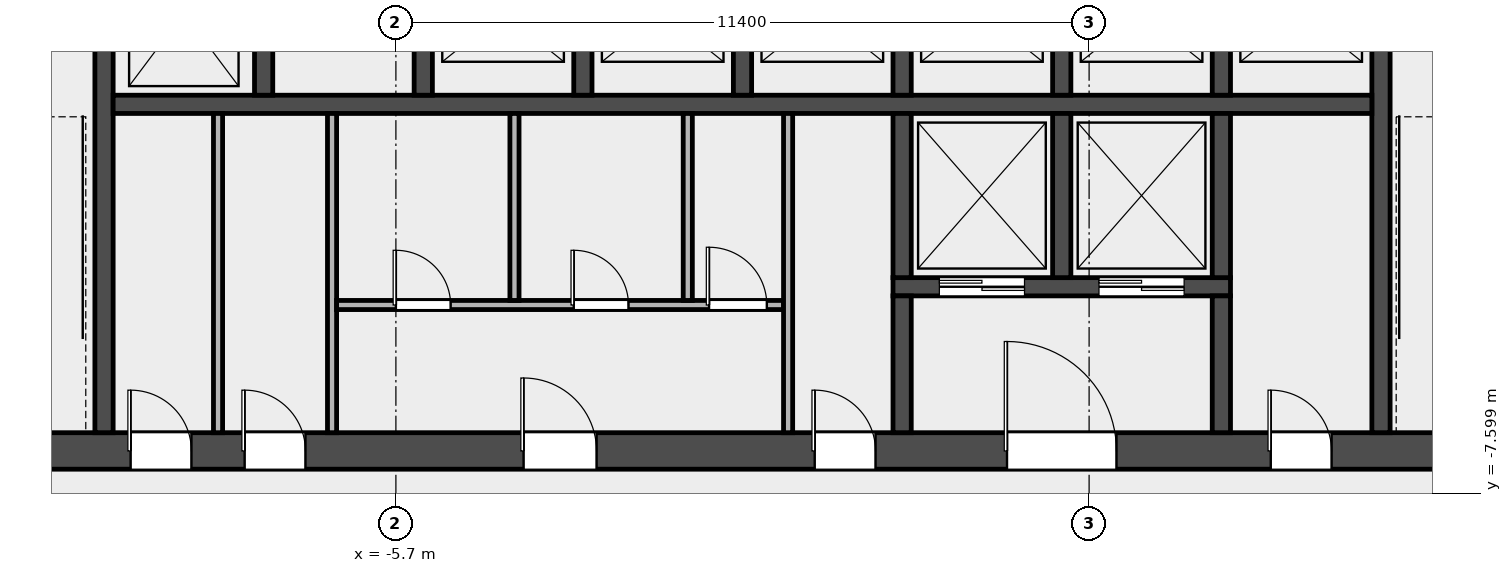
"""IFC4 building model, lengths in metres.
Left out: names, types, materials, properties, quantities, classifications, styles, units other than length and angle.
Written with IfcOpenShell. Run it as: python <this file> out.ifc"""

import sys

from ifc_helpers import new_model, si_unit, direction, frame, frame_2d, origin, place, context, subcontext, project, spatial, rectangle, extrude, element, fill, save


model = new_model("IFC4")
c1 = context("Model", 3, precision=1e-05, world=origin(), true_north=direction((0.0, 1.0)))
c2 = subcontext(c1, "Body", "Model", "MODEL_VIEW")
j1 = project(units=[si_unit("LENGTHUNIT", "METRE"), si_unit("PLANEANGLEUNIT", "RADIAN")], contexts=[c1])
p1 = place(None, origin())
s1 = spatial("IfcSite", under=j1, at=p1, CompositionType="ELEMENT")
p2 = place(p1, origin())
s2 = spatial("IfcBuilding", under=s1, at=p2, CompositionType="ELEMENT")
p3 = place(p2, frame((0.0, 0.0, 31.0)))
s3 = spatial("IfcBuildingStorey", under=s2, at=p3, CompositionType="ELEMENT", Elevation=31.0)
p4 = place(p3, frame((-14.4, -6.9, 0.0), z_axis=(0.0, 0.0, 1.0), x_axis=(1.0, 0.0, 0.0)))
e1 = element("IfcWall", 1, at=p4, inside=s3, PredefinedType="SHEAR", context=c2, shape_type="SweptSolid", body=[
    extrude(rectangle(XDim=28.8, YDim=0.6, at=frame_2d((14.4, 0.0))), origin(), (0.0, 0.0, 1.0), 4.5),
])
p5 = place(p4, frame((4.337, 0.0, 0.0)))
e2 = element("IfcOpeningElement", 2, at=p5, cuts=e1, PredefinedType="OPENING", context=c2, shape_type="SweptSolid", body=[
    extrude(rectangle(XDim=1.0, YDim=2.1, at=frame_2d((0.5, 1.05))), frame((0.0, 0.312, 0.0), z_axis=(0.0, -1.0, 0.0), x_axis=(1.0, 0.0, 0.0)), (0.0, 0.0, 1.0), 0.624),
])
p6 = place(p4, frame((6.212, 0.0, 0.0)))
e3 = element("IfcOpeningElement", 3, at=p6, cuts=e1, PredefinedType="OPENING", context=c2, shape_type="SweptSolid", body=[
    extrude(rectangle(XDim=1.0, YDim=2.1, at=frame_2d((0.5, 1.05))), frame((0.0, 0.312, 0.0), z_axis=(0.0, -1.0, 0.0), x_axis=(1.0, 0.0, 0.0)), (0.0, 0.0, 1.0), 0.624),
])
p7 = place(p4, frame((10.8, 0.0, 0.0)))
e4 = element("IfcOpeningElement", 4, at=p7, cuts=e1, PredefinedType="OPENING", context=c2, shape_type="SweptSolid", body=[
    extrude(rectangle(XDim=1.2, YDim=2.1, at=frame_2d((0.6, 1.05))), frame((0.0, 0.312, 0.0), z_axis=(0.0, -1.0, 0.0), x_axis=(1.0, 0.0, 0.0)), (0.0, 0.0, 1.0), 0.624),
])
p8 = place(p4, frame((15.587, 0.0, 0.0)))
e5 = element("IfcOpeningElement", 5, at=p8, cuts=e1, PredefinedType="OPENING", context=c2, shape_type="SweptSolid", body=[
    extrude(rectangle(XDim=1.0, YDim=2.1, at=frame_2d((0.5, 1.05))), frame((0.0, 0.312, 0.0), z_axis=(0.0, -1.0, 0.0), x_axis=(1.0, 0.0, 0.0)), (0.0, 0.0, 1.0), 0.624),
])
p9 = place(p4, frame((18.75, 0.0, 0.0)))
e6 = element("IfcOpeningElement", 6, at=p9, cuts=e1, PredefinedType="OPENING", context=c2, shape_type="SweptSolid", body=[
    extrude(rectangle(XDim=1.8, YDim=2.1, at=frame_2d((0.9, 1.05))), frame((0.0, 0.312, 0.0), z_axis=(0.0, -1.0, 0.0), x_axis=(1.0, 0.0, 0.0)), (0.0, 0.0, 1.0), 0.624),
])
p10 = place(p4, frame((23.087, 0.0, 0.0)))
e7 = element("IfcOpeningElement", 7, at=p10, cuts=e1, PredefinedType="OPENING", context=c2, shape_type="SweptSolid", body=[
    extrude(rectangle(XDim=1.0, YDim=2.1, at=frame_2d((0.5, 1.05))), frame((0.0, 0.312, 0.0), z_axis=(0.0, -1.0, 0.0), x_axis=(1.0, 0.0, 0.0)), (0.0, 0.0, 1.0), 0.624),
])
for number, where, z_axis, x_axis in (
    (8, (-10.5, -6.6, 0.0), (0.0, 0.0, 1.0), (0.0, 1.0, 0.0)),
    (9, (10.5, -6.6, 0.0), (0.0, 0.0, 1.0), (0.0, 1.0, 0.0)),
):
    element("IfcWall", number, at=place(p3, frame(where, z_axis=z_axis, x_axis=x_axis)), inside=s3, PredefinedType="SHEAR", context=c2, shape_type="SweptSolid", body=[
        extrude(rectangle(XDim=8.55, YDim=0.3, at=frame_2d((4.275, 0.0))), origin(), (0.0, 0.0, 1.0), 4.5),
    ])
p11 = place(p3, frame((-10.35, -1.2, 0.0), z_axis=(0.0, 0.0, 1.0), x_axis=(1.0, 0.0, 0.0)))
e10 = element("IfcWall", 10, at=p11, inside=s3, PredefinedType="SOLIDWALL", context=c2, shape_type="SweptSolid", body=[
    extrude(rectangle(XDim=20.7, YDim=0.3, at=frame_2d((10.35, 0.0))), origin(), (0.0, 0.0, 1.0), 4.5),
])
for number, where, z_axis, x_axis in (
    (11, (-7.875, -1.05, 0.0), (0.0, 0.0, 1.0), (0.0, 1.0, 0.0)),
    (12, (-5.25, -1.05, 0.0), (0.0, 0.0, 1.0), (0.0, 1.0, 0.0)),
    (13, (-2.625, -1.05, 0.0), (0.0, 0.0, 1.0), (0.0, 1.0, 0.0)),
    (14, (0.0, -1.05, 0.0), (0.0, 0.0, 1.0), (0.0, 1.0, 0.0)),
    (15, (2.625, -1.05, 0.0), (0.0, 0.0, 1.0), (0.0, 1.0, 0.0)),
    (16, (5.25, -1.05, 0.0), (0.0, 0.0, 1.0), (0.0, 1.0, 0.0)),
    (17, (7.875, -1.05, 0.0), (0.0, 0.0, 1.0), (0.0, 1.0, 0.0)),
):
    element("IfcWall", number, at=place(p3, frame(where, z_axis=z_axis, x_axis=x_axis)), inside=s3, PredefinedType="SOLIDWALL", context=c2, shape_type="SweptSolid", body=[
        extrude(rectangle(XDim=2.7, YDim=0.3, at=frame_2d((1.35, 0.0))), origin(), (0.0, 0.0, 1.0), 4.5),
    ])
p12 = place(p3, frame((2.475, -4.2, 0.0), z_axis=(0.0, 0.0, 1.0), x_axis=(1.0, 0.0, 0.0)))
e18 = element("IfcWall", 18, at=p12, inside=s3, PredefinedType="SOLIDWALL", context=c2, shape_type="SweptSolid", body=[
    extrude(rectangle(XDim=5.55, YDim=0.3, at=frame_2d((2.775, 0.0))), origin(), (0.0, 0.0, 1.0), 4.5),
])
p13 = place(p12, frame((0.762, 0.0, 0.0)))
e19 = element("IfcOpeningElement", 19, at=p13, cuts=e18, PredefinedType="OPENING", context=c2, shape_type="SweptSolid", body=[
    extrude(rectangle(XDim=1.4, YDim=2.1, at=frame_2d((0.7, 1.05))), frame((0.0, 0.162, 0.0), z_axis=(0.0, -1.0, 0.0), x_axis=(1.0, 0.0, 0.0)), (0.0, 0.0, 1.0), 0.324),
])
p14 = place(p12, frame((3.387, 0.0, 0.0)))
e20 = element("IfcOpeningElement", 20, at=p14, cuts=e18, PredefinedType="OPENING", context=c2, shape_type="SweptSolid", body=[
    extrude(rectangle(XDim=1.4, YDim=2.1, at=frame_2d((0.7, 1.05))), frame((0.0, 0.162, 0.0), z_axis=(0.0, -1.0, 0.0), x_axis=(1.0, 0.0, 0.0)), (0.0, 0.0, 1.0), 0.324),
])
p15 = place(p3, frame((2.625, -4.05, 0.0), z_axis=(0.0, 0.0, 1.0), x_axis=(0.0, 1.0, 0.0)))
e21 = element("IfcWall", 21, at=p15, inside=s3, PredefinedType="SOLIDWALL", context=c2, shape_type="SweptSolid", body=[
    extrude(rectangle(XDim=2.7, YDim=0.3, at=frame_2d((1.35, 0.0))), origin(), (0.0, 0.0, 1.0), 4.5),
])
p16 = place(p3, frame((2.625, -6.6, 0.0), z_axis=(0.0, 0.0, 1.0), x_axis=(0.0, 1.0, 0.0)))
e22 = element("IfcWall", 22, at=p16, inside=s3, PredefinedType="SOLIDWALL", context=c2, shape_type="SweptSolid", body=[
    extrude(rectangle(XDim=2.25, YDim=0.3, at=frame_2d((1.125, 0.0))), origin(), (0.0, 0.0, 1.0), 4.5),
])
for number, where, z_axis, x_axis in (
    (23, (5.25, -4.05, 0.0), (0.0, 0.0, 1.0), (0.0, 1.0, 0.0)),
    (24, (7.875, -4.05, 0.0), (0.0, 0.0, 1.0), (0.0, 1.0, 0.0)),
):
    element("IfcWall", number, at=place(p3, frame(where, z_axis=z_axis, x_axis=x_axis)), inside=s3, PredefinedType="SOLIDWALL", context=c2, shape_type="SweptSolid", body=[
        extrude(rectangle(XDim=2.7, YDim=0.3, at=frame_2d((1.35, 0.0))), origin(), (0.0, 0.0, 1.0), 4.5),
    ])
p17 = place(p3, frame((7.875, -6.6, 0.0), z_axis=(0.0, 0.0, 1.0), x_axis=(0.0, 1.0, 0.0)))
e25 = element("IfcWall", 25, at=p17, inside=s3, PredefinedType="SOLIDWALL", context=c2, shape_type="SweptSolid", body=[
    extrude(rectangle(XDim=2.25, YDim=0.3, at=frame_2d((1.125, 0.0))), origin(), (0.0, 0.0, 1.0), 4.5),
])
for number, where, z_axis, x_axis in (
    (26, (-8.625, -6.6, 0.0), (0.0, 0.0, 1.0), (0.0, 1.0, 0.0)),
    (27, (-6.75, -6.6, 0.0), (0.0, 0.0, 1.0), (0.0, 1.0, 0.0)),
):
    element("IfcWall", number, at=place(p3, frame(where, z_axis=z_axis, x_axis=x_axis)), inside=s3, PredefinedType="PARTITIONING", context=c2, shape_type="SweptSolid", body=[
        extrude(rectangle(XDim=5.25, YDim=0.15, at=frame_2d((2.625, 0.0))), origin(), (0.0, 0.0, 1.0), 4.5),
    ])
p18 = place(p3, frame((-6.675, -4.5, 0.0), z_axis=(0.0, 0.0, 1.0), x_axis=(1.0, 0.0, 0.0)))
e28 = element("IfcWall", 28, at=p18, inside=s3, PredefinedType="PARTITIONING", context=c2, shape_type="SweptSolid", body=[
    extrude(rectangle(XDim=7.35, YDim=0.15, at=frame_2d((3.675, 0.0))), origin(), (0.0, 0.0, 1.0), 4.5),
])
p19 = place(p18, frame((0.975, 0.0, 0.0)))
e29 = element("IfcOpeningElement", 29, at=p19, cuts=e28, PredefinedType="OPENING", context=c2, shape_type="SweptSolid", body=[
    extrude(rectangle(XDim=0.9, YDim=2.1, at=frame_2d((0.45, 1.05))), frame((0.0, 0.087, 0.0), z_axis=(0.0, -1.0, 0.0), x_axis=(1.0, 0.0, 0.0)), (0.0, 0.0, 1.0), 0.174),
])
p20 = place(p18, frame((3.9, 0.0, 0.0)))
e30 = element("IfcOpeningElement", 30, at=p20, cuts=e28, PredefinedType="OPENING", context=c2, shape_type="SweptSolid", body=[
    extrude(rectangle(XDim=0.9, YDim=2.1, at=frame_2d((0.45, 1.05))), frame((0.0, 0.087, 0.0), z_axis=(0.0, -1.0, 0.0), x_axis=(1.0, 0.0, 0.0)), (0.0, 0.0, 1.0), 0.174),
])
p21 = place(p18, frame((6.125, 0.0, 0.0)))
e31 = element("IfcOpeningElement", 31, at=p21, cuts=e28, PredefinedType="OPENING", context=c2, shape_type="SweptSolid", body=[
    extrude(rectangle(XDim=0.95, YDim=2.1, at=frame_2d((0.475, 1.05))), frame((0.0, 0.087, 0.0), z_axis=(0.0, -1.0, 0.0), x_axis=(1.0, 0.0, 0.0)), (0.0, 0.0, 1.0), 0.174),
])
for number, where, z_axis, x_axis in (
    (32, (-3.75, -4.425, 0.0), (0.0, 0.0, 1.0), (0.0, 1.0, 0.0)),
    (33, (-0.9, -4.425, 0.0), (0.0, 0.0, 1.0), (0.0, 1.0, 0.0)),
):
    element("IfcWall", number, at=place(p3, frame(where, z_axis=z_axis, x_axis=x_axis)), inside=s3, PredefinedType="PARTITIONING", context=c2, shape_type="SweptSolid", body=[
        extrude(rectangle(XDim=3.075, YDim=0.15, at=frame_2d((1.538, 0.0))), origin(), (0.0, 0.0, 1.0), 4.5),
    ])
p22 = place(p3, frame((0.75, -6.6, 0.0), z_axis=(0.0, 0.0, 1.0), x_axis=(0.0, 1.0, 0.0)))
e34 = element("IfcWall", 34, at=p22, inside=s3, PredefinedType="PARTITIONING", context=c2, shape_type="SweptSolid", body=[
    extrude(rectangle(XDim=5.25, YDim=0.15, at=frame_2d((2.625, 0.0))), origin(), (0.0, 0.0, 1.0), 4.5),
])
p23 = place(p13, origin())
e35 = element("IfcDoor", 35, at=p23, inside=s3, OperationType="DOUBLE_DOOR_SLIDING", PredefinedType="DOOR", context=c2, shape_type="SweptSolid", body=[
    extrude(rectangle(XDim=1.4, YDim=2.1, at=frame_2d((0.7, 1.05))), frame((0.0, 0.025, 0.0), z_axis=(0.0, -1.0, 0.0), x_axis=(1.0, 0.0, 0.0)), (0.0, 0.0, 1.0), 0.05),
])
fill(e19, e35)
p24 = place(p14, origin())
e36 = element("IfcDoor", 36, at=p24, inside=s3, OperationType="DOUBLE_DOOR_SLIDING", PredefinedType="DOOR", context=c2, shape_type="SweptSolid", body=[
    extrude(rectangle(XDim=1.4, YDim=2.1, at=frame_2d((0.7, 1.05))), frame((0.0, 0.025, 0.0), z_axis=(0.0, -1.0, 0.0), x_axis=(1.0, 0.0, 0.0)), (0.0, 0.0, 1.0), 0.05),
])
fill(e20, e36)
p25 = place(p5, origin())
e37 = element("IfcDoor", 37, at=p25, inside=s3, OperationType="SINGLE_SWING_LEFT", PredefinedType="DOOR", context=c2, shape_type="SweptSolid", body=[
    extrude(rectangle(XDim=1.0, YDim=2.1, at=frame_2d((0.5, 1.05))), frame((0.0, 0.025, 0.0), z_axis=(0.0, -1.0, 0.0), x_axis=(1.0, 0.0, 0.0)), (0.0, 0.0, 1.0), 0.05),
])
fill(e2, e37)
p26 = place(p6, origin())
e38 = element("IfcDoor", 38, at=p26, inside=s3, OperationType="SINGLE_SWING_LEFT", PredefinedType="DOOR", context=c2, shape_type="SweptSolid", body=[
    extrude(rectangle(XDim=1.0, YDim=2.1, at=frame_2d((0.5, 1.05))), frame((0.0, 0.025, 0.0), z_axis=(0.0, -1.0, 0.0), x_axis=(1.0, 0.0, 0.0)), (0.0, 0.0, 1.0), 0.05),
])
fill(e3, e38)
p27 = place(p7, origin())
e39 = element("IfcDoor", 39, at=p27, inside=s3, OperationType="SINGLE_SWING_LEFT", PredefinedType="DOOR", context=c2, shape_type="SweptSolid", body=[
    extrude(rectangle(XDim=1.2, YDim=2.1, at=frame_2d((0.6, 1.05))), frame((0.0, 0.025, 0.0), z_axis=(0.0, -1.0, 0.0), x_axis=(1.0, 0.0, 0.0)), (0.0, 0.0, 1.0), 0.05),
])
fill(e4, e39)
p28 = place(p19, origin())
e40 = element("IfcDoor", 40, at=p28, inside=s3, OperationType="SINGLE_SWING_LEFT", PredefinedType="DOOR", context=c2, shape_type="SweptSolid", body=[
    extrude(rectangle(XDim=0.9, YDim=2.1, at=frame_2d((0.45, 1.05))), frame((0.0, 0.025, 0.0), z_axis=(0.0, -1.0, 0.0), x_axis=(1.0, 0.0, 0.0)), (0.0, 0.0, 1.0), 0.05),
])
fill(e29, e40)
p29 = place(p20, origin())
e41 = element("IfcDoor", 41, at=p29, inside=s3, OperationType="SINGLE_SWING_LEFT", PredefinedType="DOOR", context=c2, shape_type="SweptSolid", body=[
    extrude(rectangle(XDim=0.9, YDim=2.1, at=frame_2d((0.45, 1.05))), frame((0.0, 0.025, 0.0), z_axis=(0.0, -1.0, 0.0), x_axis=(1.0, 0.0, 0.0)), (0.0, 0.0, 1.0), 0.05),
])
fill(e30, e41)
p30 = place(p21, origin())
e42 = element("IfcDoor", 42, at=p30, inside=s3, OperationType="SINGLE_SWING_LEFT", PredefinedType="DOOR", context=c2, shape_type="SweptSolid", body=[
    extrude(rectangle(XDim=0.95, YDim=2.1, at=frame_2d((0.475, 1.05))), frame((0.0, 0.025, 0.0), z_axis=(0.0, -1.0, 0.0), x_axis=(1.0, 0.0, 0.0)), (0.0, 0.0, 1.0), 0.05),
])
fill(e31, e42)
p31 = place(p8, origin())
e43 = element("IfcDoor", 43, at=p31, inside=s3, OperationType="SINGLE_SWING_LEFT", PredefinedType="DOOR", context=c2, shape_type="SweptSolid", body=[
    extrude(rectangle(XDim=1.0, YDim=2.1, at=frame_2d((0.5, 1.05))), frame((0.0, 0.025, 0.0), z_axis=(0.0, -1.0, 0.0), x_axis=(1.0, 0.0, 0.0)), (0.0, 0.0, 1.0), 0.05),
])
fill(e5, e43)
p32 = place(p9, origin())
e44 = element("IfcDoor", 44, at=p32, inside=s3, OperationType="DOUBLE_DOOR_SINGLE_SWING", PredefinedType="DOOR", context=c2, shape_type="SweptSolid", body=[
    extrude(rectangle(XDim=1.8, YDim=2.1, at=frame_2d((0.9, 1.05))), frame((0.0, 0.025, 0.0), z_axis=(0.0, -1.0, 0.0), x_axis=(1.0, 0.0, 0.0)), (0.0, 0.0, 1.0), 0.05),
])
fill(e6, e44)
p33 = place(p10, origin())
e45 = element("IfcDoor", 45, at=p33, inside=s3, OperationType="SINGLE_SWING_LEFT", PredefinedType="DOOR", context=c2, shape_type="SweptSolid", body=[
    extrude(rectangle(XDim=1.0, YDim=2.1, at=frame_2d((0.5, 1.05))), frame((0.0, 0.025, 0.0), z_axis=(0.0, -1.0, 0.0), x_axis=(1.0, 0.0, 0.0)), (0.0, 0.0, 1.0), 0.05),
])
fill(e7, e45)
save(model, sys.argv[1])
